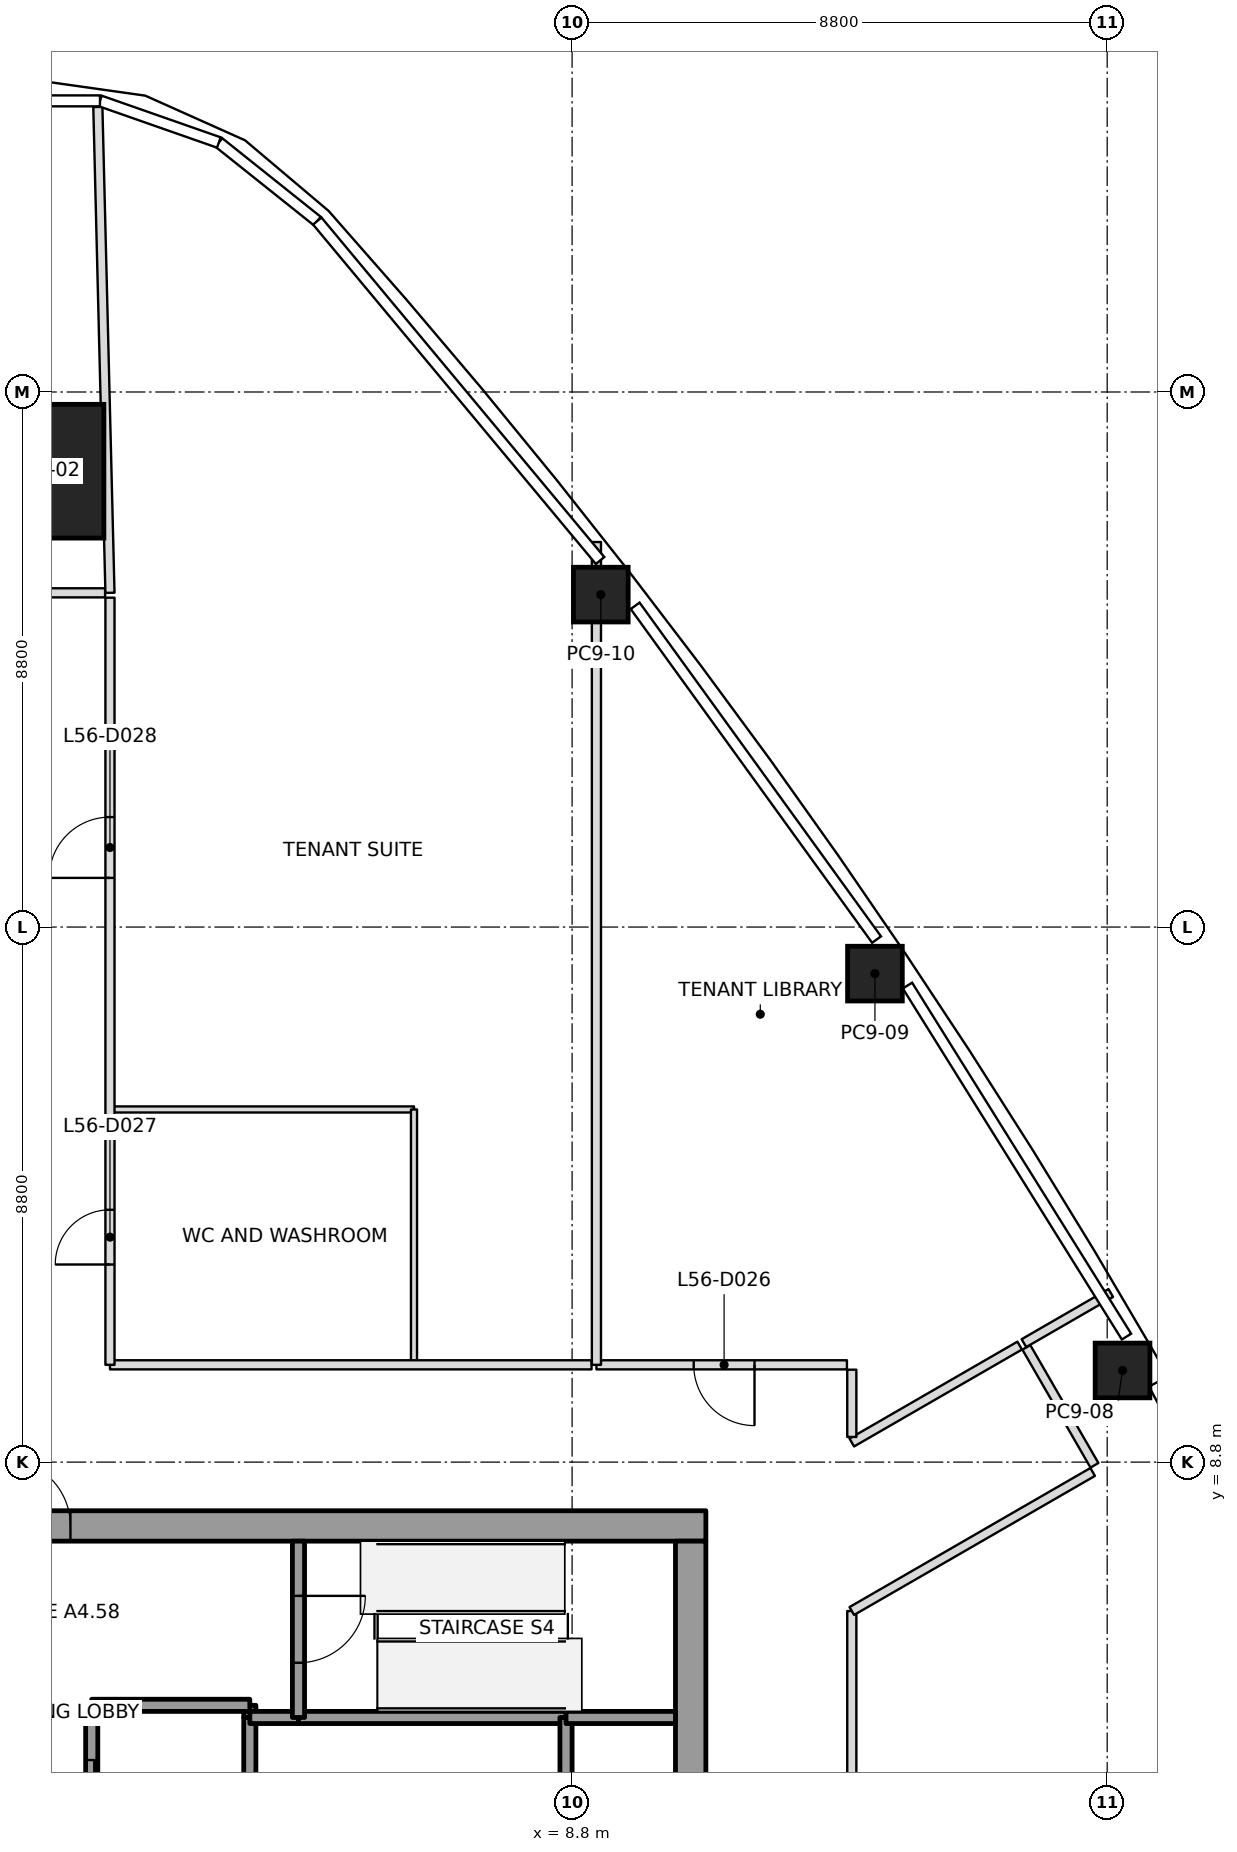
"""IFC4 building model, lengths in metres.
Left out: names, types, materials, properties, quantities, classifications, styles, units other than length and angle.
Written with IfcOpenShell. Run it as: python <this file> out.ifc"""

import sys

from ifc_helpers import new_model, si_unit, direction, frame, frame_2d, origin, origin_2d, place, context, subcontext, project, spatial, rectangle, extrude, element, fill, save


model = new_model("IFC4")
c1 = context("Model", 3, precision=1e-05, world=origin(), true_north=direction((0.0, 1.0)))
c2 = subcontext(c1, "Body", "Model", "MODEL_VIEW")
j1 = project(units=[si_unit("LENGTHUNIT", "METRE"), si_unit("PLANEANGLEUNIT", "RADIAN")], contexts=[c1])
p1 = place(None, origin())
s1 = spatial("IfcSite", under=j1, at=p1, CompositionType="ELEMENT")
p2 = place(p1, origin())
s2 = spatial("IfcBuilding", under=s1, at=p2, CompositionType="ELEMENT")
p3 = place(p2, frame((0.0, 0.0, 251.0)))
s3 = spatial("IfcBuildingStorey", under=s2, at=p3, CompositionType="ELEMENT", Elevation=251.0)
p4 = place(p3, frame((0.0, 25.097, 0.0), z_axis=(0.0, -0.032148900677, 0.999483090495), x_axis=(1.0, 0.0, 0.0)))
e1 = element("IfcColumn", 1, at=p4, inside=s3, PredefinedType="COLUMN", context=c2, shape_type="SweptSolid", body=[
    extrude(rectangle(XDim=2.2, YDim=2.2, at=origin_2d()), origin(), (0.0, 0.0, 1.0), 4.002),
])
p5 = place(p3, frame((17.853, 10.307, 0.0), z_axis=(-0.009887049298, -0.00573692984, 0.999934664812), x_axis=(-0.499975560967, 0.866039512843, 2.5126546e-05)))
e2 = element("IfcColumn", 2, at=p5, inside=s3, PredefinedType="COLUMN", context=c2, shape_type="SweptSolid", body=[
    extrude(rectangle(XDim=0.9, YDim=0.9, at=origin_2d()), origin(), (0.0, 0.0, 1.0), 4.0),
])
p6 = place(p3, frame((13.781, 16.834, 0.0), z_axis=(-0.00530952661, -0.013121243922, 0.999899815924), x_axis=(-0.557996523735, 0.829805432153, 0.007926176169)))
e3 = element("IfcColumn", 3, at=p6, inside=s3, PredefinedType="COLUMN", context=c2, shape_type="SweptSolid", body=[
    extrude(rectangle(XDim=0.9, YDim=0.9, at=origin_2d()), origin(), (0.0, 0.0, 1.0), 4.0),
])
p7 = place(p3, frame((9.272, 23.068, 0.0), z_axis=(-0.000244089904, -0.020381506962, 0.999792245716), x_axis=(-0.613402004991, 0.789609823037, 0.015947025932)))
e4 = element("IfcColumn", 4, at=p7, inside=s3, PredefinedType="COLUMN", context=c2, shape_type="SweptSolid", body=[
    extrude(rectangle(XDim=0.9, YDim=0.9, at=origin_2d()), origin(), (0.0, 0.0, 1.0), 4.001),
])
p8 = place(p3, frame((-11.0, 7.75, 0.0), z_axis=(0.0, 0.0, 1.0), x_axis=(1.0, 0.0, 0.0)))
e5 = element("IfcWall", 5, at=p8, inside=s3, PredefinedType="SHEAR", context=c2, shape_type="SweptSolid", body=[
    extrude(rectangle(XDim=22.0, YDim=0.5, at=frame_2d((11.0, 0.0))), origin(), (0.0, 0.0, 1.0), 4.0),
])
p9 = place(p8, frame((10.45, 0.0, 0.0)))
e6 = element("IfcOpeningElement", 6, at=p9, cuts=e5, PredefinedType="OPENING", context=c2, shape_type="SweptSolid", body=[
    extrude(rectangle(XDim=1.1, YDim=2.1, at=frame_2d((0.55, 1.05))), frame((0.0, 0.25, 0.0), z_axis=(0.0, -1.0, 0.0), x_axis=(1.0, 0.0, 0.0)), (0.0, 0.0, 1.0), 0.5),
])
p10 = place(p3, frame((10.75, -7.5, 0.0), z_axis=(0.0, 0.0, 1.0), x_axis=(0.0, 1.0, 0.0)))
e7 = element("IfcWall", 7, at=p10, inside=s3, PredefinedType="SHEAR", context=c2, shape_type="SweptSolid", body=[
    extrude(rectangle(XDim=15.0, YDim=0.5, at=frame_2d((7.5, 0.0))), origin(), (0.0, 0.0, 1.0), 4.0),
])
p11 = place(p10, frame((6.6, 0.0, 0.0)))
e8 = element("IfcOpeningElement", 8, at=p11, cuts=e7, PredefinedType="OPENING", context=c2, shape_type="SweptSolid", body=[
    extrude(rectangle(XDim=1.8, YDim=2.1, at=frame_2d((0.9, 1.05))), frame((0.0, 0.25, 0.0), z_axis=(0.0, -1.0, 0.0), x_axis=(1.0, 0.0, 0.0)), (0.0, 0.0, 1.0), 0.5),
])
p12 = place(p3, frame((3.5, 4.6, 0.0), z_axis=(0.0, 0.0, 1.0), x_axis=(0.0, 1.0, 0.0)))
e9 = element("IfcWall", 9, at=p12, inside=s3, PredefinedType="SOLIDWALL", context=c2, shape_type="SweptSolid", body=[
    extrude(rectangle(XDim=0.2, YDim=0.2, at=frame_2d((0.1, 0.0))), origin(), (0.0, 0.0, 1.0), 3.85),
])
p13 = place(p3, frame((3.5, 4.8, 0.0), z_axis=(0.0, 0.0, 1.0), x_axis=(-1.0, 0.0, 0.0)))
e10 = element("IfcWall", 10, at=p13, inside=s3, PredefinedType="SOLIDWALL", context=c2, shape_type="SweptSolid", body=[
    extrude(rectangle(XDim=2.6, YDim=0.2, at=frame_2d((1.3, 0.0))), origin(), (0.0, 0.0, 1.0), 3.85),
])
p14 = place(p3, frame((0.9, 4.8, 0.0), z_axis=(0.0, 0.0, 1.0), x_axis=(0.0, -1.0, 0.0)))
e11 = element("IfcWall", 11, at=p14, inside=s3, PredefinedType="SOLIDWALL", context=c2, shape_type="SweptSolid", body=[
    extrude(rectangle(XDim=3.0, YDim=0.2, at=frame_2d((1.5, 0.0))), origin(), (0.0, 0.0, 1.0), 3.85),
])
p15 = place(p14, frame((0.9, 0.0, 0.0)))
e12 = element("IfcOpeningElement", 12, at=p15, cuts=e11, PredefinedType="OPENING", context=c2, shape_type="SweptSolid", body=[
    extrude(rectangle(XDim=1.2, YDim=2.1, at=frame_2d((0.6, 1.05))), frame((0.0, 0.1, 0.0), z_axis=(0.0, -1.0, 0.0), x_axis=(1.0, 0.0, 0.0)), (0.0, 0.0, 1.0), 0.2),
])
p16 = place(p3, frame((3.5, 4.6, 0.0), z_axis=(0.0, 0.0, 1.0), x_axis=(0.0, -1.0, 0.0)))
e13 = element("IfcWall", 13, at=p16, inside=s3, PredefinedType="SOLIDWALL", context=c2, shape_type="SweptSolid", body=[
    extrude(rectangle(XDim=2.8, YDim=0.2, at=frame_2d((1.4, 0.0))), origin(), (0.0, 0.0, 1.0), 3.85),
])
p17 = place(p3, frame((4.3, 4.6, 0.0), z_axis=(0.0, 0.0, 1.0), x_axis=(-1.0, 0.0, 0.0)))
e14 = element("IfcWall", 14, at=p17, inside=s3, PredefinedType="SOLIDWALL", context=c2, shape_type="SweptSolid", body=[
    extrude(rectangle(XDim=0.8, YDim=0.2, at=frame_2d((0.4, 0.0))), origin(), (0.0, 0.0, 1.0), 3.85),
])
p18 = place(p3, frame((8.7, 4.6, 0.0), z_axis=(0.0, 0.0, 1.0), x_axis=(-1.0, 0.0, 0.0)))
e15 = element("IfcWall", 15, at=p18, inside=s3, PredefinedType="SOLIDWALL", context=c2, shape_type="SweptSolid", body=[
    extrude(rectangle(XDim=4.4, YDim=0.2, at=frame_2d((2.2, 0.0))), origin(), (0.0, 0.0, 1.0), 3.85),
])
p19 = place(p3, frame((4.3, 7.5, 0.0), z_axis=(0.0, 0.0, 1.0), x_axis=(0.0, -1.0, 0.0)))
e16 = element("IfcWall", 16, at=p19, inside=s3, PredefinedType="SOLIDWALL", context=c2, shape_type="SweptSolid", body=[
    extrude(rectangle(XDim=2.9, YDim=0.2, at=frame_2d((1.45, 0.0))), origin(), (0.0, 0.0, 1.0), 3.85),
])
p20 = place(p19, frame((0.9, 0.0, 0.0)))
e17 = element("IfcOpeningElement", 17, at=p20, cuts=e16, PredefinedType="OPENING", context=c2, shape_type="SweptSolid", body=[
    extrude(rectangle(XDim=1.1, YDim=2.1, at=frame_2d((0.55, 1.05))), frame((0.0, 0.1, 0.0), z_axis=(0.0, -1.0, 0.0), x_axis=(1.0, 0.0, 0.0)), (0.0, 0.0, 1.0), 0.2),
])
p21 = place(p3, frame((8.7, 1.8, 0.0), z_axis=(0.0, 0.0, 1.0), x_axis=(0.0, 1.0, 0.0)))
e18 = element("IfcWall", 18, at=p21, inside=s3, PredefinedType="SOLIDWALL", context=c2, shape_type="SweptSolid", body=[
    extrude(rectangle(XDim=2.8, YDim=0.2, at=frame_2d((1.4, 0.0))), origin(), (0.0, 0.0, 1.0), 3.85),
])
p22 = place(p3, frame((10.5, 4.6, 0.0), z_axis=(0.0, 0.0, 1.0), x_axis=(-1.0, 0.0, 0.0)))
e19 = element("IfcWall", 19, at=p22, inside=s3, PredefinedType="SOLIDWALL", context=c2, shape_type="SweptSolid", body=[
    extrude(rectangle(XDim=1.8, YDim=0.2, at=frame_2d((0.9, 0.0))), origin(), (0.0, 0.0, 1.0), 3.85),
])
p23 = place(p3, frame((1.2, 23.097, 0.0), z_axis=(0.0, 0.0, 1.0), x_axis=(-0.024952511821, 0.999688637604, 0.0)))
e20 = element("IfcWall", 20, at=p23, inside=s3, PredefinedType="PARTITIONING", context=c2, shape_type="SweptSolid", body=[
    extrude(rectangle(XDim=7.994, YDim=0.15, at=frame_2d((3.997, 0.0))), origin(), (0.0, 0.0, 1.0), 3.234),
])
p24 = place(p3, frame((9.2, 10.4, 0.0), z_axis=(0.0, 0.0, 1.0), x_axis=(0.0, 1.0, 0.0)))
e21 = element("IfcWall", 21, at=p24, inside=s3, PredefinedType="PARTITIONING", context=c2, shape_type="SweptSolid", body=[
    extrude(rectangle(XDim=13.533, YDim=0.15, at=frame_2d((6.766, 0.0))), origin(), (0.0, 0.0, 1.0), 3.317),
])
p25 = place(p3, frame((20.647, 6.201, 0.0), z_axis=(0.0, 0.0, 1.0), x_axis=(-0.500014063744, -0.866017283926, 0.0)))
e22 = element("IfcWall", 22, at=p25, inside=s3, PredefinedType="PARTITIONING", context=c2, shape_type="SweptSolid", body=[
    extrude(rectangle(XDim=14.494, YDim=0.15, at=frame_2d((7.247, 0.0))), origin(), (0.0, 0.0, 1.0), 3.234),
])
p26 = place(p3, frame((16.231, 10.756, 0.0), z_axis=(0.0, 0.0, 1.0), x_axis=(0.865966208357, 0.500102515474, 0.0)))
e23 = element("IfcWall", 23, at=p26, inside=s3, PredefinedType="PARTITIONING", context=c2, shape_type="SweptSolid", body=[
    extrude(rectangle(XDim=1.65, YDim=0.15, at=frame_2d((0.825, 0.0))), origin(), (0.0, 0.0, 1.0), 3.234),
])
p27 = place(p3, frame((1.12, 23.097, 0.0), z_axis=(0.0, 0.0, 1.0), x_axis=(-1.0, 0.0, 0.0)))
e24 = element("IfcWall", 24, at=p27, inside=s3, PredefinedType="PARTITIONING", context=c2, shape_type="SweptSolid", body=[
    extrude(rectangle(XDim=2.24, YDim=0.15, at=frame_2d((1.12, 0.0))), origin(), (0.0, 0.0, 1.0), 3.233),
])
p28 = place(p3, frame((9.12, 10.4, 0.0), z_axis=(0.0, 0.0, 1.0), x_axis=(-1.0, 0.0, 0.0)))
e25 = element("IfcWall", 25, at=p28, inside=s3, PredefinedType="PARTITIONING", context=c2, shape_type="SweptSolid", body=[
    extrude(rectangle(XDim=7.92, YDim=0.15, at=frame_2d((3.96, 0.0))), origin(), (0.0, 0.0, 1.0), 3.317),
])
p29 = place(p3, frame((1.2, 10.4, 0.0), z_axis=(0.0, 0.0, 1.0), x_axis=(0.0, 1.0, 0.0)))
e26 = element("IfcWall", 26, at=p29, inside=s3, PredefinedType="PARTITIONING", context=c2, shape_type="SweptSolid", body=[
    extrude(rectangle(XDim=12.617, YDim=0.15, at=frame_2d((6.309, 0.0))), origin(), (0.0, 0.0, 1.0), 3.317),
])
p30 = place(p29, frame((1.65, 0.0, 0.0)))
e27 = element("IfcOpeningElement", 27, at=p30, cuts=e26, PredefinedType="OPENING", context=c2, shape_type="SweptSolid", body=[
    extrude(rectangle(XDim=0.9, YDim=2.1, at=frame_2d((0.45, 1.05))), frame((0.0, 0.075, 0.0), z_axis=(0.0, -1.0, 0.0), x_axis=(1.0, 0.0, 0.0)), (0.0, 0.0, 1.0), 0.15),
])
p31 = place(p29, frame((8.009, 0.0, 0.0)))
e28 = element("IfcOpeningElement", 28, at=p31, cuts=e26, PredefinedType="OPENING", context=c2, shape_type="SweptSolid", body=[
    extrude(rectangle(XDim=1.0, YDim=2.1, at=frame_2d((0.5, 1.05))), frame((0.0, 0.075, 0.0), z_axis=(0.0, -1.0, 0.0), x_axis=(1.0, 0.0, 0.0)), (0.0, 0.0, 1.0), 0.15),
])
p32 = place(p3, frame((13.32, 10.4, 0.0), z_axis=(0.0, 0.0, 1.0), x_axis=(-1.0, 0.0, 0.0)))
e29 = element("IfcWall", 29, at=p32, inside=s3, PredefinedType="PARTITIONING", context=c2, shape_type="SweptSolid", body=[
    extrude(rectangle(XDim=4.12, YDim=0.15, at=frame_2d((2.06, 0.0))), origin(), (0.0, 0.0, 1.0), 3.45),
])
p33 = place(p32, frame((1.52, 0.0, 0.0)))
e30 = element("IfcOpeningElement", 30, at=p33, cuts=e29, PredefinedType="OPENING", context=c2, shape_type="SweptSolid", body=[
    extrude(rectangle(XDim=1.0, YDim=2.1, at=frame_2d((0.5, 1.05))), frame((0.0, 0.075, 0.0), z_axis=(0.0, -1.0, 0.0), x_axis=(1.0, 0.0, 0.0)), (0.0, 0.0, 1.0), 0.15),
])
p34 = place(p3, frame((13.4, -6.351, 0.0), z_axis=(0.0, 0.0, 1.0), x_axis=(0.0, 1.0, 0.0)))
e31 = element("IfcWall", 31, at=p34, inside=s3, PredefinedType="PARTITIONING", context=c2, shape_type="SweptSolid", body=[
    extrude(rectangle(XDim=12.702, YDim=0.15, at=frame_2d((6.351, 0.0))), origin(), (0.0, 0.0, 1.0), 3.317),
])
p35 = place(p34, frame((5.851, 0.0, 0.0)))
e32 = element("IfcOpeningElement", 32, at=p35, cuts=e31, PredefinedType="OPENING", context=c2, shape_type="SweptSolid", body=[
    extrude(rectangle(XDim=1.0, YDim=2.1, at=frame_2d((0.5, 1.05))), frame((0.0, 0.075, 0.0), z_axis=(0.0, -1.0, 0.0), x_axis=(1.0, 0.0, 0.0)), (0.0, 0.0, 1.0), 0.15),
])
p36 = place(p3, frame((13.4, 6.351, 0.0), z_axis=(0.0, 0.0, 1.0), x_axis=(0.866027379035, 0.49999657875, 0.0)))
e33 = element("IfcWall", 33, at=p36, inside=s3, PredefinedType="PARTITIONING", context=c2, shape_type="SweptSolid", body=[
    extrude(rectangle(XDim=4.574, YDim=0.15, at=frame_2d((2.287, 0.0))), origin(), (0.0, 0.0, 1.0), 3.45),
])
p37 = place(p3, frame((16.161, 10.716, 0.0), z_axis=(0.0, 0.0, 1.0), x_axis=(-0.86603896, -0.499976519211, 0.0)))
e34 = element("IfcWall", 34, at=p37, inside=s3, PredefinedType="PARTITIONING", context=c2, shape_type="SweptSolid", body=[
    extrude(rectangle(XDim=3.189, YDim=0.15, at=frame_2d((1.594, 0.0))), origin(), (0.0, 0.0, 1.0), 3.45),
])
p38 = place(p3, frame((13.4, 9.214, 0.0), z_axis=(0.0, 0.0, 1.0), x_axis=(0.0, 1.0, 0.0)))
e35 = element("IfcWall", 35, at=p38, inside=s3, PredefinedType="PARTITIONING", context=c2, shape_type="SweptSolid", body=[
    extrude(rectangle(XDim=1.106, YDim=0.15, at=frame_2d((0.553, 0.0))), origin(), (0.0, 0.0, 1.0), 3.45),
])
p39 = place(p3, frame((17.391, 8.747, 0.0), z_axis=(0.0, 0.0, 1.0), x_axis=(-0.500077830873, 0.865980463445, 0.0)))
e36 = element("IfcWall", 36, at=p39, inside=s3, PredefinedType="PARTITIONING", context=c2, shape_type="SweptSolid", body=[
    extrude(rectangle(XDim=2.24, YDim=0.15, at=frame_2d((1.12, 0.0))), origin(), (0.0, 0.0, 1.0), 3.45),
])
p40 = place(p3, frame((1.23, 14.6, 0.0), z_axis=(0.0, 0.0, 1.0), x_axis=(1.0, 0.0, 0.0)))
e37 = element("IfcWall", 37, at=p40, inside=s3, PredefinedType="PARTITIONING", context=c2, shape_type="SweptSolid", body=[
    extrude(rectangle(XDim=4.97, YDim=0.1, at=frame_2d((2.485, 0.0))), origin(), (0.0, 0.0, 1.0), 3.317),
])
p41 = place(p3, frame((6.2, 14.6, 0.0), z_axis=(0.0, 0.0, 1.0), x_axis=(0.0, -1.0, 0.0)))
e38 = element("IfcWall", 38, at=p41, inside=s3, PredefinedType="PARTITIONING", context=c2, shape_type="SweptSolid", body=[
    extrude(rectangle(XDim=4.17, YDim=0.1, at=frame_2d((2.085, 0.0))), origin(), (0.0, 0.0, 1.0), 3.45),
])
p42 = place(p33, origin())
e39 = element("IfcDoor", 39, at=p42, inside=s3, OperationType="SINGLE_SWING_LEFT", PredefinedType="DOOR", context=c2, shape_type="SweptSolid", body=[
    extrude(rectangle(XDim=1.0, YDim=2.1, at=frame_2d((0.5, 1.05))), frame((0.0, 0.025, 0.0), z_axis=(0.0, -1.0, 0.0), x_axis=(1.0, 0.0, 0.0)), (0.0, 0.0, 1.0), 0.05),
])
fill(e30, e39)
p43 = place(p30, origin())
e40 = element("IfcDoor", 40, at=p43, inside=s3, OperationType="SINGLE_SWING_LEFT", PredefinedType="DOOR", context=c2, shape_type="SweptSolid", body=[
    extrude(rectangle(XDim=0.9, YDim=2.1, at=frame_2d((0.45, 1.05))), frame((0.0, 0.025, 0.0), z_axis=(0.0, -1.0, 0.0), x_axis=(1.0, 0.0, 0.0)), (0.0, 0.0, 1.0), 0.05),
])
fill(e27, e40)
p44 = place(p31, origin())
e41 = element("IfcDoor", 41, at=p44, inside=s3, OperationType="SINGLE_SWING_LEFT", PredefinedType="DOOR", context=c2, shape_type="SweptSolid", body=[
    extrude(rectangle(XDim=1.0, YDim=2.1, at=frame_2d((0.5, 1.05))), frame((0.0, 0.025, 0.0), z_axis=(0.0, -1.0, 0.0), x_axis=(1.0, 0.0, 0.0)), (0.0, 0.0, 1.0), 0.05),
])
fill(e28, e41)
p45 = place(p15, origin())
e42 = element("IfcDoor", 42, at=p45, inside=s3, OperationType="SLIDING_TO_RIGHT", PredefinedType="DOOR", context=c2, shape_type="SweptSolid", body=[
    extrude(rectangle(XDim=1.2, YDim=2.1, at=frame_2d((0.6, 1.05))), frame((0.0, 0.025, 0.0), z_axis=(0.0, -1.0, 0.0), x_axis=(1.0, 0.0, 0.0)), (0.0, 0.0, 1.0), 0.05),
])
fill(e12, e42)
p46 = place(p20, origin())
e43 = element("IfcDoor", 43, at=p46, inside=s3, OperationType="SINGLE_SWING_LEFT", PredefinedType="DOOR", context=c2, shape_type="SweptSolid", body=[
    extrude(rectangle(XDim=1.1, YDim=2.1, at=frame_2d((0.55, 1.05))), frame((0.0, 0.025, 0.0), z_axis=(0.0, -1.0, 0.0), x_axis=(1.0, 0.0, 0.0)), (0.0, 0.0, 1.0), 0.05),
])
fill(e17, e43)
p47 = place(p9, origin())
e44 = element("IfcDoor", 44, at=p47, inside=s3, OperationType="SINGLE_SWING_LEFT", PredefinedType="DOOR", context=c2, shape_type="SweptSolid", body=[
    extrude(rectangle(XDim=1.1, YDim=2.1, at=frame_2d((0.55, 1.05))), frame((0.0, 0.025, 0.0), z_axis=(0.0, -1.0, 0.0), x_axis=(1.0, 0.0, 0.0)), (0.0, 0.0, 1.0), 0.05),
])
fill(e6, e44)
save(model, sys.argv[1])
